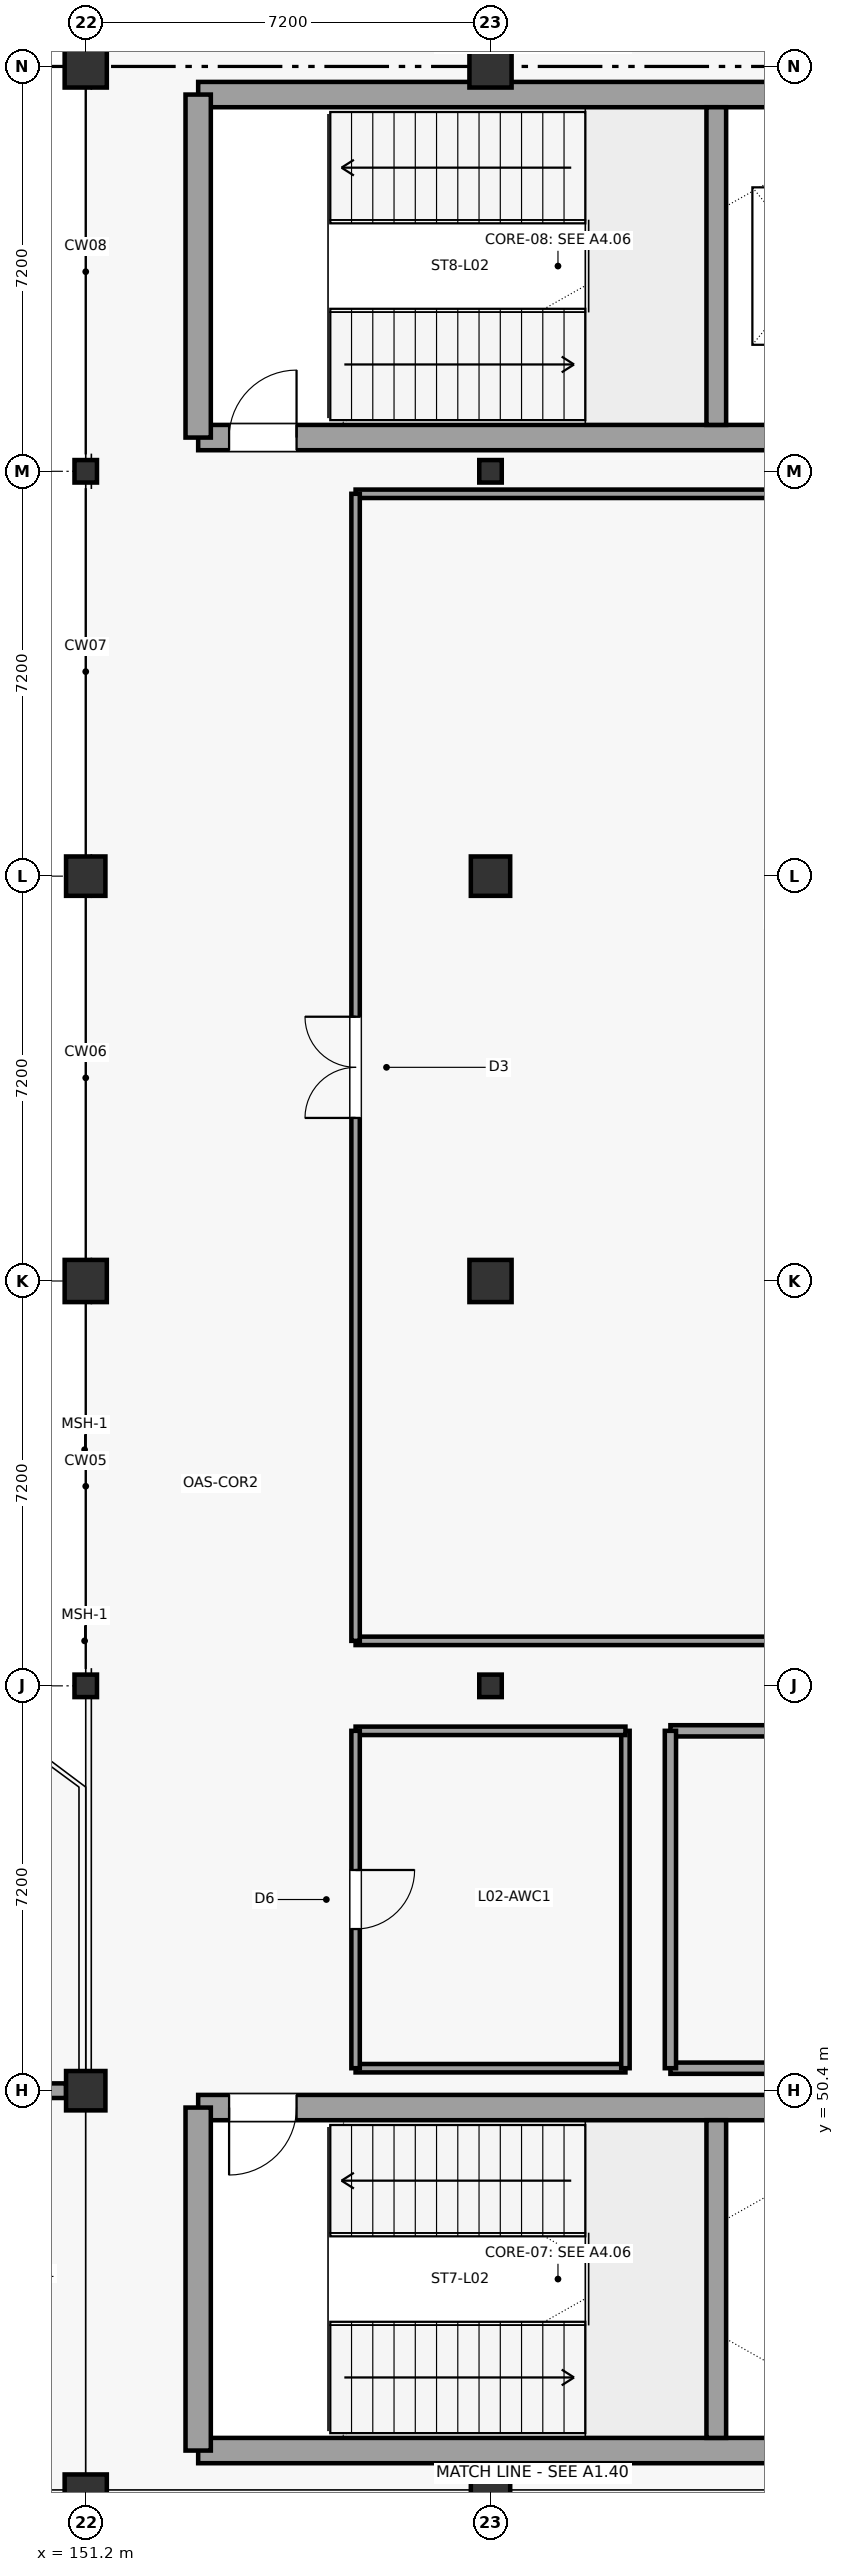
"""IFC4 building model, lengths in metres.
Left out: names, types, materials, properties, quantities, classifications, styles, units other than length and angle.
Written with IfcOpenShell. Run it as: python <this file> out.ifc"""

import sys

from ifc_helpers import new_model, si_unit, direction, frame, frame_2d, origin, origin_2d, place, context, subcontext, project, spatial, rectangle, hollow_rectangle, extrude, element, fill, save


model = new_model("IFC4")
c1 = context("Model", 3, precision=1e-05, world=origin(), true_north=direction((0.0, 1.0)))
c2 = subcontext(c1, "Body", "Model", "MODEL_VIEW")
j1 = project(units=[si_unit("LENGTHUNIT", "METRE"), si_unit("PLANEANGLEUNIT", "RADIAN")], contexts=[c1])
p1 = place(None, origin())
s1 = spatial("IfcSite", under=j1, at=p1, CompositionType="ELEMENT")
p2 = place(p1, origin())
s2 = spatial("IfcBuilding", under=s1, at=p2, CompositionType="ELEMENT")
p3 = place(p2, frame((0.0, 0.0, 9.6)))
s3 = spatial("IfcBuildingStorey", under=s2, at=p3, CompositionType="ELEMENT", Elevation=9.6)
p4 = place(p3, frame((151.2, 43.2, 0.0), z_axis=(0.0, 0.0, 1.0), x_axis=(1.0, 0.0, 0.0)))
e1 = element("IfcColumn", 1, at=p4, inside=s3, PredefinedType="COLUMN", context=c2, shape_type="SweptSolid", body=[
    extrude(rectangle(XDim=0.75, YDim=0.75, at=origin_2d()), origin(), (0.0, 0.0, 1.0), 4.2),
])
p5 = place(p3, frame((151.2, 50.4, 0.0), z_axis=(0.0, 0.0, 1.0), x_axis=(1.0, 0.0, 0.0)))
e2 = element("IfcColumn", 2, at=p5, inside=s3, PredefinedType="COLUMN", context=c2, shape_type="SweptSolid", body=[
    extrude(rectangle(XDim=0.7, YDim=0.7, at=origin_2d()), origin(), (0.0, 0.0, 1.0), 4.2),
])
p6 = place(p3, frame((151.2, 57.6, 0.0), z_axis=(0.0, 0.0, 1.0), x_axis=(1.0, 0.0, 0.0)))
e3 = element("IfcColumn", 3, at=p6, inside=s3, PredefinedType="COLUMN", context=c2, shape_type="SweptSolid", body=[
    extrude(hollow_rectangle(XDim=0.4, YDim=0.4, WallThickness=0.02, at=origin_2d()), origin(), (0.0, 0.0, 1.0), 4.2),
])
p7 = place(p3, frame((151.2, 64.8, 0.0), z_axis=(0.0, 0.0, 1.0), x_axis=(1.0, 0.0, 0.0)))
e4 = element("IfcColumn", 4, at=p7, inside=s3, PredefinedType="COLUMN", context=c2, shape_type="SweptSolid", body=[
    extrude(rectangle(XDim=0.75, YDim=0.75, at=origin_2d()), origin(), (0.0, 0.0, 1.0), 4.2),
])
p8 = place(p3, frame((151.2, 72.0, 0.0), z_axis=(0.0, 0.0, 1.0), x_axis=(1.0, 0.0, 0.0)))
e5 = element("IfcColumn", 5, at=p8, inside=s3, PredefinedType="COLUMN", context=c2, shape_type="SweptSolid", body=[
    extrude(rectangle(XDim=0.7, YDim=0.7, at=origin_2d()), origin(), (0.0, 0.0, 1.0), 4.2),
])
p9 = place(p3, frame((151.2, 79.2, 0.0), z_axis=(0.0, 0.0, 1.0), x_axis=(1.0, 0.0, 0.0)))
e6 = element("IfcColumn", 6, at=p9, inside=s3, PredefinedType="COLUMN", context=c2, shape_type="SweptSolid", body=[
    extrude(hollow_rectangle(XDim=0.4, YDim=0.4, WallThickness=0.02, at=origin_2d()), origin(), (0.0, 0.0, 1.0), 4.2),
])
p10 = place(p3, frame((151.2, 86.4, 0.0), z_axis=(0.0, 0.0, 1.0), x_axis=(1.0, 0.0, 0.0)))
e7 = element("IfcColumn", 7, at=p10, inside=s3, PredefinedType="COLUMN", context=c2, shape_type="SweptSolid", body=[
    extrude(rectangle(XDim=0.75, YDim=0.75, at=origin_2d()), origin(), (0.0, 0.0, 1.0), 4.2),
])
p11 = place(p3, frame((158.4, 43.2, 0.0), z_axis=(0.0, 0.0, 1.0), x_axis=(1.0, 0.0, 0.0)))
e8 = element("IfcColumn", 8, at=p11, inside=s3, PredefinedType="COLUMN", context=c2, shape_type="SweptSolid", body=[
    extrude(rectangle(XDim=0.7, YDim=0.7, at=origin_2d()), origin(), (0.0, 0.0, 1.0), 4.2),
])
p12 = place(p3, frame((158.4, 57.6, 0.0), z_axis=(0.0, 0.0, 1.0), x_axis=(1.0, 0.0, 0.0)))
e9 = element("IfcColumn", 9, at=p12, inside=s3, PredefinedType="COLUMN", context=c2, shape_type="SweptSolid", body=[
    extrude(hollow_rectangle(XDim=0.4, YDim=0.4, WallThickness=0.02, at=origin_2d()), origin(), (0.0, 0.0, 1.0), 4.2),
])
p13 = place(p3, frame((158.4, 64.8, 0.0), z_axis=(0.0, 0.0, 1.0), x_axis=(1.0, 0.0, 0.0)))
e10 = element("IfcColumn", 10, at=p13, inside=s3, PredefinedType="COLUMN", context=c2, shape_type="SweptSolid", body=[
    extrude(rectangle(XDim=0.75, YDim=0.75, at=origin_2d()), origin(), (0.0, 0.0, 1.0), 4.2),
])
p14 = place(p3, frame((158.4, 72.0, 0.0), z_axis=(0.0, 0.0, 1.0), x_axis=(1.0, 0.0, 0.0)))
e11 = element("IfcColumn", 11, at=p14, inside=s3, PredefinedType="COLUMN", context=c2, shape_type="SweptSolid", body=[
    extrude(rectangle(XDim=0.7, YDim=0.7, at=origin_2d()), origin(), (0.0, 0.0, 1.0), 4.2),
])
p15 = place(p3, frame((158.4, 79.2, 0.0), z_axis=(0.0, 0.0, 1.0), x_axis=(1.0, 0.0, 0.0)))
e12 = element("IfcColumn", 12, at=p15, inside=s3, PredefinedType="COLUMN", context=c2, shape_type="SweptSolid", body=[
    extrude(hollow_rectangle(XDim=0.4, YDim=0.4, WallThickness=0.02, at=origin_2d()), origin(), (0.0, 0.0, 1.0), 4.2),
])
p16 = place(p3, frame((158.4, 86.4, 0.0), z_axis=(0.0, 0.0, 1.0), x_axis=(1.0, 0.0, 0.0)))
e13 = element("IfcColumn", 13, at=p16, inside=s3, PredefinedType="COLUMN", context=c2, shape_type="SweptSolid", body=[
    extrude(rectangle(XDim=0.75, YDim=0.75, at=origin_2d()), origin(), (0.0, 0.0, 1.0), 4.2),
])
p17 = place(p3, frame((153.2, 44.0, 0.0), z_axis=(0.0, 0.0, 1.0), x_axis=(1.0, 0.0, 0.0)))
e14 = element("IfcWall", 14, at=p17, inside=s3, PredefinedType="SHEAR", context=c2, shape_type="SweptSolid", body=[
    extrude(rectangle(XDim=12.8, YDim=0.45, at=frame_2d((6.4, 0.0))), origin(), (0.0, 0.0, 1.0), 3.88),
])
p18 = place(p3, frame((153.2, 50.1, 0.0), z_axis=(0.0, 0.0, 1.0), x_axis=(1.0, 0.0, 0.0)))
e15 = element("IfcWall", 15, at=p18, inside=s3, PredefinedType="SHEAR", context=c2, shape_type="SweptSolid", body=[
    extrude(rectangle(XDim=12.8, YDim=0.45, at=frame_2d((6.4, 0.0))), origin(), (0.0, 0.0, 1.0), 3.88),
])
p19 = place(p18, frame((0.55, 0.0, 0.0)))
e16 = element("IfcOpeningElement", 16, at=p19, cuts=e15, PredefinedType="OPENING", context=c2, shape_type="SweptSolid", body=[
    extrude(rectangle(XDim=1.2, YDim=2.25, at=frame_2d((0.6, 1.125))), frame((0.0, 0.235, 0.0), z_axis=(0.0, -1.0, 0.0), x_axis=(1.0, 0.0, 0.0)), (0.0, 0.0, 1.0), 0.47),
])
p20 = place(p18, frame((10.458, 0.0, 0.0)))
e17 = element("IfcOpeningElement", 17, at=p20, cuts=e15, PredefinedType="OPENING", context=c2, shape_type="SweptSolid", body=[
    extrude(rectangle(XDim=1.1, YDim=2.2, at=frame_2d((0.55, 1.1))), frame((0.0, 0.235, 0.0), z_axis=(0.0, -1.0, 0.0), x_axis=(1.0, 0.0, 0.0)), (0.0, 0.0, 1.0), 0.47),
])
p21 = place(p3, frame((153.2, 44.0, 0.0), z_axis=(0.0, 0.0, 1.0), x_axis=(0.0, 1.0, 0.0)))
e18 = element("IfcWall", 18, at=p21, inside=s3, PredefinedType="SHEAR", context=c2, shape_type="SweptSolid", body=[
    extrude(rectangle(XDim=6.1, YDim=0.45, at=frame_2d((3.05, 0.0))), origin(), (0.0, 0.0, 1.0), 3.88),
])
p22 = place(p3, frame((162.416, 44.225, 0.0), z_axis=(0.0, 0.0, 1.0), x_axis=(0.0, 1.0, 0.0)))
e19 = element("IfcWall", 19, at=p22, inside=s3, PredefinedType="SHEAR", context=c2, shape_type="SweptSolid", body=[
    extrude(rectangle(XDim=5.65, YDim=0.35, at=frame_2d((2.825, 0.0))), origin(), (0.0, 0.0, 1.0), 3.88),
])
p23 = place(p3, frame((153.2, 79.8, 0.0), z_axis=(0.0, 0.0, 1.0), x_axis=(1.0, 0.0, 0.0)))
e20 = element("IfcWall", 20, at=p23, inside=s3, PredefinedType="SHEAR", context=c2, shape_type="SweptSolid", body=[
    extrude(rectangle(XDim=12.8, YDim=0.45, at=frame_2d((6.4, 0.0))), origin(), (0.0, 0.0, 1.0), 3.88),
])
p24 = place(p23, frame((0.55, 0.0, 0.0)))
e21 = element("IfcOpeningElement", 21, at=p24, cuts=e20, PredefinedType="OPENING", context=c2, shape_type="SweptSolid", body=[
    extrude(rectangle(XDim=1.2, YDim=2.25, at=frame_2d((0.6, 1.125))), frame((0.0, 0.235, 0.0), z_axis=(0.0, -1.0, 0.0), x_axis=(1.0, 0.0, 0.0)), (0.0, 0.0, 1.0), 0.47),
])
p25 = place(p23, frame((10.108, 0.0, 0.0)))
e22 = element("IfcOpeningElement", 22, at=p25, cuts=e20, PredefinedType="OPENING", context=c2, shape_type="SweptSolid", body=[
    extrude(rectangle(XDim=1.8, YDim=2.4, at=frame_2d((0.9, 1.2))), frame((0.0, 0.235, 0.0), z_axis=(0.0, -1.0, 0.0), x_axis=(1.0, 0.0, 0.0)), (0.0, 0.0, 1.0), 0.47),
])
p26 = place(p3, frame((153.2, 85.9, 0.0), z_axis=(0.0, 0.0, 1.0), x_axis=(1.0, 0.0, 0.0)))
e23 = element("IfcWall", 23, at=p26, inside=s3, PredefinedType="SHEAR", context=c2, shape_type="SweptSolid", body=[
    extrude(rectangle(XDim=12.8, YDim=0.45, at=frame_2d((6.4, 0.0))), origin(), (0.0, 0.0, 1.0), 3.88),
])
p27 = place(p3, frame((153.2, 79.8, 0.0), z_axis=(0.0, 0.0, 1.0), x_axis=(0.0, 1.0, 0.0)))
e24 = element("IfcWall", 24, at=p27, inside=s3, PredefinedType="SHEAR", context=c2, shape_type="SweptSolid", body=[
    extrude(rectangle(XDim=6.1, YDim=0.45, at=frame_2d((3.05, 0.0))), origin(), (0.0, 0.0, 1.0), 3.88),
])
p28 = place(p3, frame((162.416, 80.025, 0.0), z_axis=(0.0, 0.0, 1.0), x_axis=(0.0, 1.0, 0.0)))
e25 = element("IfcWall", 25, at=p28, inside=s3, PredefinedType="SHEAR", context=c2, shape_type="SweptSolid", body=[
    extrude(rectangle(XDim=5.65, YDim=0.35, at=frame_2d((2.825, 0.0))), origin(), (0.0, 0.0, 1.0), 3.88),
])
p29 = place(p3, frame((144.35, 50.4, 0.0), z_axis=(0.0, 0.0, 1.0), x_axis=(1.0, 0.0, 0.0)))
e26 = element("IfcWall", 26, at=p29, inside=s3, PredefinedType="SOLIDWALL", context=c2, shape_type="SweptSolid", body=[
    extrude(rectangle(XDim=6.5, YDim=0.26, at=frame_2d((3.25, 0.0))), origin(), (0.0, 0.0, 1.0), 2.94),
])
p30 = place(p29, frame((2.35, 0.0, 0.0)))
e27 = element("IfcOpeningElement", 27, at=p30, cuts=e26, PredefinedType="OPENING", context=c2, shape_type="SweptSolid", body=[
    extrude(rectangle(XDim=1.8, YDim=2.35, at=frame_2d((0.9, 1.175))), frame((0.0, 0.14, 0.0), z_axis=(0.0, -1.0, 0.0), x_axis=(1.0, 0.0, 0.0)), (0.0, 0.0, 1.0), 0.28),
])
for number, where, z_axis, x_axis in (
    (28, (156.0, 58.4, 0.0), (0.0, 0.0, 1.0), (1.0, 0.0, 0.0)),
    (29, (171.6, 78.8, 0.0), (0.0, 0.0, 1.0), (-1.0, 0.0, 0.0)),
):
    element("IfcWall", number, at=place(p3, frame(where, z_axis=z_axis, x_axis=x_axis)), inside=s3, PredefinedType="PARTITIONING", context=c2, shape_type="SweptSolid", body=[
        extrude(rectangle(XDim=15.6, YDim=0.15, at=frame_2d((7.8, 0.0))), origin(), (0.0, 0.0, 1.0), 2.94),
    ])
p31 = place(p3, frame((156.0, 78.8, 0.0), z_axis=(0.0, 0.0, 1.0), x_axis=(0.0, -1.0, 0.0)))
e30 = element("IfcWall", 30, at=p31, inside=s3, PredefinedType="PARTITIONING", context=c2, shape_type="SweptSolid", body=[
    extrude(rectangle(XDim=20.4, YDim=0.15, at=frame_2d((10.2, 0.0))), origin(), (0.0, 0.0, 1.0), 2.94),
])
p32 = place(p31, frame((9.3, 0.0, 0.0)))
e31 = element("IfcOpeningElement", 31, at=p32, cuts=e30, PredefinedType="OPENING", context=c2, shape_type="SweptSolid", body=[
    extrude(rectangle(XDim=1.8, YDim=2.3, at=frame_2d((0.9, 1.15))), frame((0.0, 0.085, 0.0), z_axis=(0.0, -1.0, 0.0), x_axis=(1.0, 0.0, 0.0)), (0.0, 0.0, 1.0), 0.17),
])
p33 = place(p3, frame((156.0, 50.8, 0.0), z_axis=(0.0, 0.0, 1.0), x_axis=(1.0, 0.0, 0.0)))
e32 = element("IfcWall", 32, at=p33, inside=s3, PredefinedType="PARTITIONING", context=c2, shape_type="SweptSolid", body=[
    extrude(rectangle(XDim=4.8, YDim=0.15, at=frame_2d((2.4, 0.0))), origin(), (0.0, 0.0, 1.0), 2.94),
])
p34 = place(p3, frame((160.8, 50.8, 0.0), z_axis=(0.0, 0.0, 1.0), x_axis=(0.0, 1.0, 0.0)))
e33 = element("IfcWall", 33, at=p34, inside=s3, PredefinedType="PARTITIONING", context=c2, shape_type="SweptSolid", body=[
    extrude(rectangle(XDim=6.0, YDim=0.15, at=frame_2d((3.0, 0.0))), origin(), (0.0, 0.0, 1.0), 2.94),
])
p35 = place(p3, frame((160.8, 56.8, 0.0), z_axis=(0.0, 0.0, 1.0), x_axis=(-1.0, 0.0, 0.0)))
e34 = element("IfcWall", 34, at=p35, inside=s3, PredefinedType="PARTITIONING", context=c2, shape_type="SweptSolid", body=[
    extrude(rectangle(XDim=4.8, YDim=0.15, at=frame_2d((2.4, 0.0))), origin(), (0.0, 0.0, 1.0), 2.94),
])
p36 = place(p3, frame((156.0, 56.8, 0.0), z_axis=(0.0, 0.0, 1.0), x_axis=(0.0, -1.0, 0.0)))
e35 = element("IfcWall", 35, at=p36, inside=s3, PredefinedType="PARTITIONING", context=c2, shape_type="SweptSolid", body=[
    extrude(rectangle(XDim=6.0, YDim=0.15, at=frame_2d((3.0, 0.0))), origin(), (0.0, 0.0, 1.0), 2.94),
])
p37 = place(p36, frame((2.475, 0.0, 0.0)))
e36 = element("IfcOpeningElement", 36, at=p37, cuts=e35, PredefinedType="OPENING", context=c2, shape_type="SweptSolid", body=[
    extrude(rectangle(XDim=1.05, YDim=2.2, at=frame_2d((0.525, 1.1))), frame((0.0, 0.085, 0.0), z_axis=(0.0, -1.0, 0.0), x_axis=(1.0, 0.0, 0.0)), (0.0, 0.0, 1.0), 0.17),
])
p38 = place(p3, frame((161.6, 50.8, 0.0), z_axis=(0.0, 0.0, 1.0), x_axis=(1.0, 0.0, 0.0)))
e37 = element("IfcWall", 37, at=p38, inside=s3, PredefinedType="PARTITIONING", context=c2, shape_type="SweptSolid", body=[
    extrude(rectangle(XDim=5.0, YDim=0.2, at=frame_2d((2.5, 0.0))), origin(), (0.0, 0.0, 1.0), 2.94),
])
p39 = place(p38, frame((1.9, 0.0, 0.0)))
e38 = element("IfcOpeningElement", 38, at=p39, cuts=e37, PredefinedType="OPENING", context=c2, shape_type="SweptSolid", body=[
    extrude(rectangle(XDim=1.2, YDim=2.25, at=frame_2d((0.6, 1.125))), frame((0.0, 0.11, 0.0), z_axis=(0.0, -1.0, 0.0), x_axis=(1.0, 0.0, 0.0)), (0.0, 0.0, 1.0), 0.22),
])
p40 = place(p3, frame((166.6, 56.8, 0.0), z_axis=(0.0, 0.0, 1.0), x_axis=(-1.0, 0.0, 0.0)))
e39 = element("IfcWall", 39, at=p40, inside=s3, PredefinedType="PARTITIONING", context=c2, shape_type="SweptSolid", body=[
    extrude(rectangle(XDim=5.0, YDim=0.2, at=frame_2d((2.5, 0.0))), origin(), (0.0, 0.0, 1.0), 2.94),
])
p41 = place(p3, frame((161.6, 56.8, 0.0), z_axis=(0.0, 0.0, 1.0), x_axis=(0.0, -1.0, 0.0)))
e40 = element("IfcWall", 40, at=p41, inside=s3, PredefinedType="PARTITIONING", context=c2, shape_type="SweptSolid", body=[
    extrude(rectangle(XDim=6.0, YDim=0.2, at=frame_2d((3.0, 0.0))), origin(), (0.0, 0.0, 1.0), 2.94),
])
p42 = place(p19, frame((1.2, 0.0, 0.0), z_axis=(0.0, 0.0, 1.0), x_axis=(-1.0, 0.0, 0.0)))
e41 = element("IfcDoor", 41, at=p42, inside=s3, OperationType="SINGLE_SWING_LEFT", PredefinedType="DOOR", context=c2, shape_type="SweptSolid", body=[
    extrude(rectangle(XDim=1.2, YDim=2.25, at=frame_2d((0.6, 1.125))), frame((0.0, 0.025, 0.0), z_axis=(0.0, -1.0, 0.0), x_axis=(1.0, 0.0, 0.0)), (0.0, 0.0, 1.0), 0.05),
])
fill(e16, e41)
p43 = place(p24, origin())
e42 = element("IfcDoor", 42, at=p43, inside=s3, OperationType="SINGLE_SWING_RIGHT", PredefinedType="DOOR", context=c2, shape_type="SweptSolid", body=[
    extrude(rectangle(XDim=1.2, YDim=2.25, at=frame_2d((0.6, 1.125))), frame((0.0, 0.025, 0.0), z_axis=(0.0, -1.0, 0.0), x_axis=(1.0, 0.0, 0.0)), (0.0, 0.0, 1.0), 0.05),
])
fill(e21, e42)
p44 = place(p32, frame((1.8, 0.0, 0.0), z_axis=(0.0, 0.0, 1.0), x_axis=(-1.0, 0.0, 0.0)))
e43 = element("IfcDoor", 43, at=p44, inside=s3, OperationType="DOUBLE_DOOR_SINGLE_SWING", PredefinedType="DOOR", context=c2, shape_type="SweptSolid", body=[
    extrude(rectangle(XDim=1.8, YDim=2.3, at=frame_2d((0.9, 1.15))), frame((0.0, 0.025, 0.0), z_axis=(0.0, -1.0, 0.0), x_axis=(1.0, 0.0, 0.0)), (0.0, 0.0, 1.0), 0.05),
])
fill(e31, e43)
p45 = place(p37, origin())
e44 = element("IfcDoor", 44, at=p45, inside=s3, OperationType="SINGLE_SWING_LEFT", PredefinedType="DOOR", context=c2, shape_type="SweptSolid", body=[
    extrude(rectangle(XDim=1.05, YDim=2.2, at=frame_2d((0.525, 1.1))), frame((0.0, 0.025, 0.0), z_axis=(0.0, -1.0, 0.0), x_axis=(1.0, 0.0, 0.0)), (0.0, 0.0, 1.0), 0.05),
])
fill(e36, e44)
save(model, sys.argv[1])
